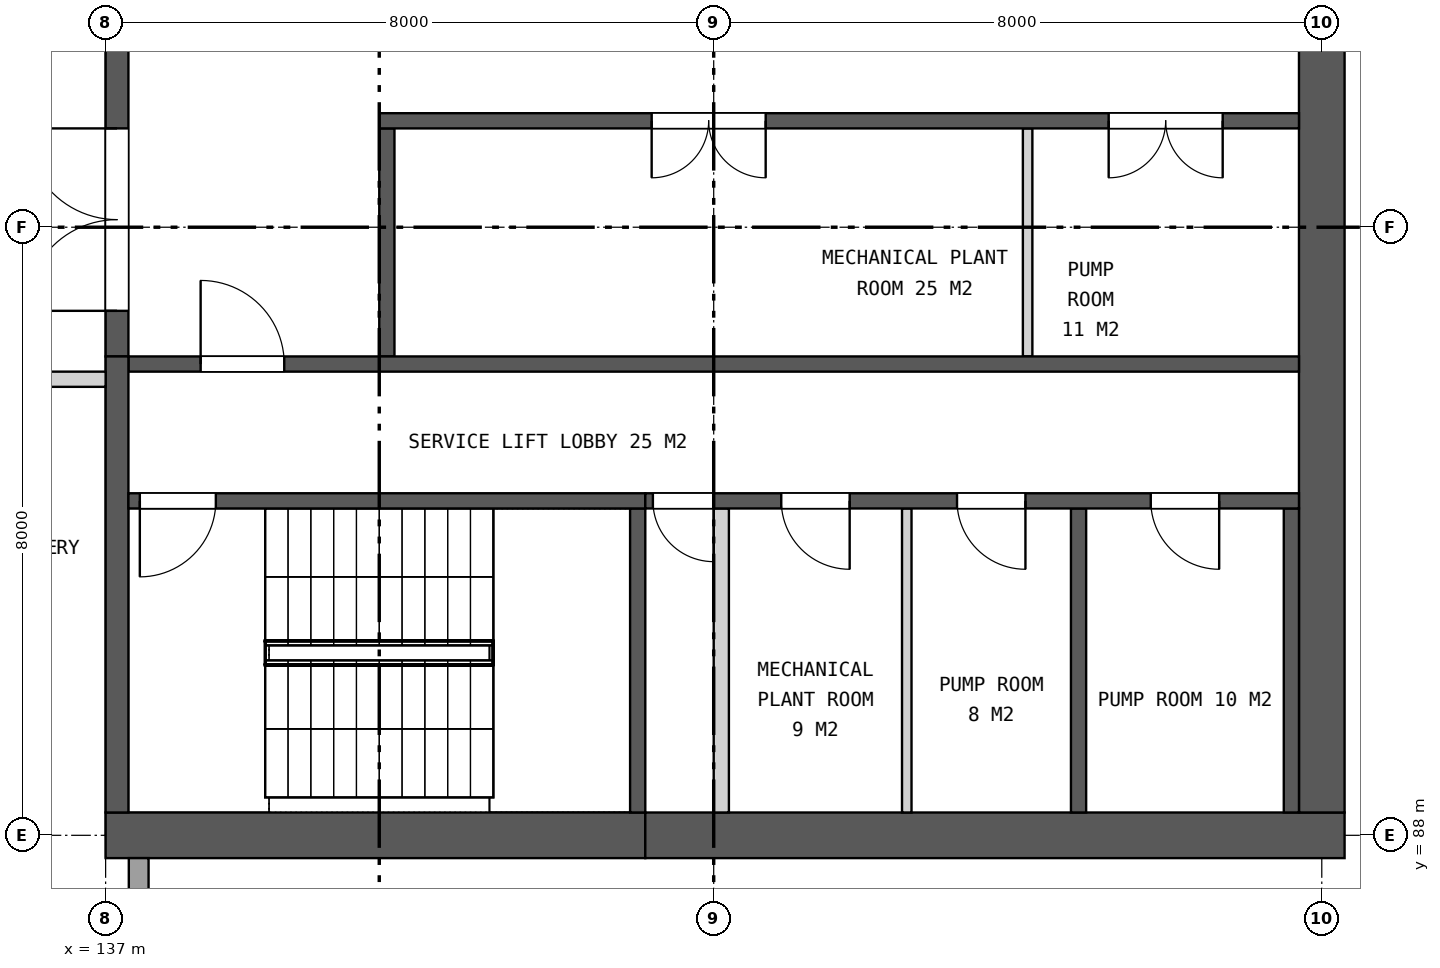
"""IFC4 building model, lengths in metres.
Left out: names, types, materials, properties, quantities, classifications, styles, units other than length and angle.
Written with IfcOpenShell. Run it as: python <this file> out.ifc"""

import sys

from ifc_helpers import new_model, si_unit, direction, frame, frame_2d, origin, place, context, subcontext, project, spatial, rectangle, extrude, element, fill, save


model = new_model("IFC4")
c1 = context("Model", 3, precision=1e-05, world=origin(), true_north=direction((0.0, 1.0)))
c2 = subcontext(c1, "Body", "Model", "MODEL_VIEW")
j1 = project(units=[si_unit("LENGTHUNIT", "METRE"), si_unit("PLANEANGLEUNIT", "RADIAN")], contexts=[c1])
p1 = place(None, origin())
s1 = spatial("IfcSite", under=j1, at=p1, CompositionType="ELEMENT")
p2 = place(p1, origin())
s2 = spatial("IfcBuilding", under=s1, at=p2, CompositionType="ELEMENT")
p3 = place(p2, frame((0.0, 0.0, 237.7)))
s3 = spatial("IfcBuildingStorey", under=s2, at=p3, CompositionType="ELEMENT", Elevation=237.7)
p4 = place(p3, frame((137.0, 88.0, 0.0), z_axis=(0.0, 0.0, 1.0), x_axis=(1.0, 0.0, 0.0)))
e1 = element("IfcWall", 1, at=p4, inside=s3, PredefinedType="SHEAR", context=c2, shape_type="SweptSolid", body=[
    extrude(rectangle(XDim=7.1, YDim=0.6, at=frame_2d((3.55, 0.0))), origin(), (0.0, 0.0, 1.0), 7.4),
])
p5 = place(p3, frame((144.1, 88.0, 0.0), z_axis=(0.0, 0.0, 1.0), x_axis=(1.0, 0.0, 0.0)))
e2 = element("IfcWall", 2, at=p5, inside=s3, PredefinedType="SHEAR", context=c2, shape_type="SweptSolid", body=[
    extrude(rectangle(XDim=9.2, YDim=0.6, at=frame_2d((4.6, 0.0))), origin(), (0.0, 0.0, 1.0), 7.4),
])
p6 = place(p3, frame((153.0, 88.3, 0.0), z_axis=(0.0, 0.0, 1.0), x_axis=(0.0, 1.0, 0.0)))
e3 = element("IfcWall", 3, at=p6, inside=s3, PredefinedType="SHEAR", context=c2, shape_type="SweptSolid", body=[
    extrude(rectangle(XDim=23.4, YDim=0.6, at=frame_2d((11.7, 0.0))), origin(), (0.0, 0.0, 1.0), 7.4),
])
p7 = place(p3, frame((137.15, 94.3, 0.0), z_axis=(0.0, 0.0, 1.0), x_axis=(0.0, 1.0, 0.0)))
e4 = element("IfcWall", 4, at=p7, inside=s3, PredefinedType="SHEAR", context=c2, shape_type="SweptSolid", body=[
    extrude(rectangle(XDim=11.4, YDim=0.3, at=frame_2d((5.7, 0.0))), origin(), (0.0, 0.0, 1.0), 7.4),
])
p8 = place(p7, frame((0.6, 0.0, 0.0)))
e5 = element("IfcOpeningElement", 5, at=p8, cuts=e4, PredefinedType="OPENING", context=c2, shape_type="SweptSolid", body=[
    extrude(rectangle(XDim=2.4, YDim=2.4, at=frame_2d((1.2, 1.2))), frame((0.0, 0.16, 0.0), z_axis=(0.0, -1.0, 0.0), x_axis=(1.0, 0.0, 0.0)), (0.0, 0.0, 1.0), 0.32),
])
p9 = place(p7, frame((4.5, 0.0, 0.0)))
e6 = element("IfcOpeningElement", 6, at=p9, cuts=e4, PredefinedType="OPENING", context=c2, shape_type="SweptSolid", body=[
    extrude(rectangle(XDim=2.4, YDim=2.4, at=frame_2d((1.2, 1.2))), frame((0.0, 0.16, 0.0), z_axis=(0.0, -1.0, 0.0), x_axis=(1.0, 0.0, 0.0)), (0.0, 0.0, 1.0), 0.32),
])
p10 = place(p7, frame((8.4, 0.0, 0.0)))
e7 = element("IfcOpeningElement", 7, at=p10, cuts=e4, PredefinedType="OPENING", context=c2, shape_type="SweptSolid", body=[
    extrude(rectangle(XDim=2.4, YDim=2.4, at=frame_2d((1.2, 1.2))), frame((0.0, 0.16, 0.0), z_axis=(0.0, -1.0, 0.0), x_axis=(1.0, 0.0, 0.0)), (0.0, 0.0, 1.0), 0.32),
])
p11 = place(p3, frame((140.7, 94.3, 0.0), z_axis=(0.0, 0.0, 1.0), x_axis=(0.0, 1.0, 0.0)))
e8 = element("IfcWall", 8, at=p11, inside=s3, PredefinedType="SHEAR", context=c2, shape_type="SweptSolid", body=[
    extrude(rectangle(XDim=3.0, YDim=0.2, at=frame_2d((1.5, 0.0))), origin(), (0.0, 0.0, 1.0), 7.4),
])
p12 = place(p3, frame((149.13, 94.3, 0.0), z_axis=(0.0, 0.0, 1.0), x_axis=(0.0, 1.0, 0.0)))
e9 = element("IfcWall", 9, at=p12, inside=s3, PredefinedType="PARTITIONING", context=c2, shape_type="SweptSolid", body=[
    extrude(rectangle(XDim=3.0, YDim=0.125, at=frame_2d((1.5, 0.0))), origin(), (0.0, 0.0, 1.0), 7.4),
])
p13 = place(p3, frame((140.6, 97.4, 0.0), z_axis=(0.0, 0.0, 1.0), x_axis=(1.0, 0.0, 0.0)))
e10 = element("IfcWall", 10, at=p13, inside=s3, PredefinedType="SHEAR", context=c2, shape_type="SweptSolid", body=[
    extrude(rectangle(XDim=12.1, YDim=0.2, at=frame_2d((6.05, 0.0))), origin(), (0.0, 0.0, 1.0), 7.4),
])
p14 = place(p13, frame((3.584, 0.0, 0.0)))
e11 = element("IfcOpeningElement", 11, at=p14, cuts=e10, PredefinedType="OPENING", context=c2, shape_type="SweptSolid", body=[
    extrude(rectangle(XDim=1.5, YDim=2.1, at=frame_2d((0.75, 1.05))), frame((0.0, 0.11, 0.0), z_axis=(0.0, -1.0, 0.0), x_axis=(1.0, 0.0, 0.0)), (0.0, 0.0, 1.0), 0.22),
])
p15 = place(p13, frame((9.596, 0.0, 0.0)))
e12 = element("IfcOpeningElement", 12, at=p15, cuts=e10, PredefinedType="OPENING", context=c2, shape_type="SweptSolid", body=[
    extrude(rectangle(XDim=1.5, YDim=2.1, at=frame_2d((0.75, 1.05))), frame((0.0, 0.11, 0.0), z_axis=(0.0, -1.0, 0.0), x_axis=(1.0, 0.0, 0.0)), (0.0, 0.0, 1.0), 0.22),
])
p16 = place(p3, frame((137.3, 94.2, 0.0), z_axis=(0.0, 0.0, 1.0), x_axis=(1.0, 0.0, 0.0)))
e13 = element("IfcWall", 13, at=p16, inside=s3, PredefinedType="SHEAR", context=c2, shape_type="SweptSolid", body=[
    extrude(rectangle(XDim=15.4, YDim=0.2, at=frame_2d((7.7, 0.0))), origin(), (0.0, 0.0, 1.0), 7.4),
])
p17 = place(p16, frame((0.95, 0.0, 0.0)))
e14 = element("IfcOpeningElement", 14, at=p17, cuts=e13, PredefinedType="OPENING", context=c2, shape_type="SweptSolid", body=[
    extrude(rectangle(XDim=1.1, YDim=2.1, at=frame_2d((0.55, 1.05))), frame((0.0, 0.11, 0.0), z_axis=(0.0, -1.0, 0.0), x_axis=(1.0, 0.0, 0.0)), (0.0, 0.0, 1.0), 0.22),
])
p18 = place(p3, frame((137.15, 88.3, 0.0), z_axis=(0.0, 0.0, 1.0), x_axis=(0.0, 1.0, 0.0)))
e15 = element("IfcWall", 15, at=p18, inside=s3, PredefinedType="SHEAR", context=c2, shape_type="SweptSolid", body=[
    extrude(rectangle(XDim=6.0, YDim=0.3, at=frame_2d((3.0, 0.0))), origin(), (0.0, 0.0, 1.0), 7.4),
])
for number, where, z_axis, x_axis in (
    (16, (144.0, 88.3, 0.0), (0.0, 0.0, 1.0), (0.0, 1.0, 0.0)),
    (17, (149.8, 88.3, 0.0), (0.0, 0.0, 1.0), (0.0, 1.0, 0.0)),
    (18, (152.6, 88.3, 0.0), (0.0, 0.0, 1.0), (0.0, 1.0, 0.0)),
):
    element("IfcWall", number, at=place(p3, frame(where, z_axis=z_axis, x_axis=x_axis)), inside=s3, PredefinedType="SHEAR", context=c2, shape_type="SweptSolid", body=[
        extrude(rectangle(XDim=4.0, YDim=0.2, at=frame_2d((2.0, 0.0))), origin(), (0.0, 0.0, 1.0), 7.4),
    ])
p19 = place(p3, frame((145.1, 88.3, 0.0), z_axis=(0.0, 0.0, 1.0), x_axis=(0.0, 1.0, 0.0)))
e19 = element("IfcWall", 19, at=p19, inside=s3, PredefinedType="PARTITIONING", context=c2, shape_type="SweptSolid", body=[
    extrude(rectangle(XDim=4.0, YDim=0.2, at=frame_2d((2.0, 0.0))), origin(), (0.0, 0.0, 1.0), 7.4),
])
p20 = place(p3, frame((147.54, 88.3, 0.0), z_axis=(0.0, 0.0, 1.0), x_axis=(0.0, 1.0, 0.0)))
e20 = element("IfcWall", 20, at=p20, inside=s3, PredefinedType="PARTITIONING", context=c2, shape_type="SweptSolid", body=[
    extrude(rectangle(XDim=4.0, YDim=0.125, at=frame_2d((2.0, 0.0))), origin(), (0.0, 0.0, 1.0), 7.4),
])
p21 = place(p3, frame((137.3, 92.4, 0.0), z_axis=(0.0, 0.0, 1.0), x_axis=(1.0, 0.0, 0.0)))
e21 = element("IfcWall", 21, at=p21, inside=s3, PredefinedType="SHEAR", context=c2, shape_type="SweptSolid", body=[
    extrude(rectangle(XDim=6.8, YDim=0.2, at=frame_2d((3.4, 0.0))), origin(), (0.0, 0.0, 1.0), 7.4),
])
p22 = place(p21, frame((0.15, 0.0, 0.0)))
e22 = element("IfcOpeningElement", 22, at=p22, cuts=e21, PredefinedType="OPENING", context=c2, shape_type="SweptSolid", body=[
    extrude(rectangle(XDim=1.0, YDim=2.1, at=frame_2d((0.5, 1.05))), frame((0.0, 0.11, 0.0), z_axis=(0.0, -1.0, 0.0), x_axis=(1.0, 0.0, 0.0)), (0.0, 0.0, 1.0), 0.22),
])
p23 = place(p3, frame((144.1, 92.4, 0.0), z_axis=(0.0, 0.0, 1.0), x_axis=(1.0, 0.0, 0.0)))
e23 = element("IfcWall", 23, at=p23, inside=s3, PredefinedType="SHEAR", context=c2, shape_type="SweptSolid", body=[
    extrude(rectangle(XDim=8.6, YDim=0.2, at=frame_2d((4.3, 0.0))), origin(), (0.0, 0.0, 1.0), 7.4),
])
p24 = place(p23, frame((0.1, 0.0, 0.0)))
e24 = element("IfcOpeningElement", 24, at=p24, cuts=e23, PredefinedType="OPENING", context=c2, shape_type="SweptSolid", body=[
    extrude(rectangle(XDim=0.8, YDim=2.1, at=frame_2d((0.4, 1.05))), frame((0.0, 0.11, 0.0), z_axis=(0.0, -1.0, 0.0), x_axis=(1.0, 0.0, 0.0)), (0.0, 0.0, 1.0), 0.22),
])
p25 = place(p23, frame((1.789, 0.0, 0.0)))
e25 = element("IfcOpeningElement", 25, at=p25, cuts=e23, PredefinedType="OPENING", context=c2, shape_type="SweptSolid", body=[
    extrude(rectangle(XDim=0.9, YDim=2.1, at=frame_2d((0.45, 1.05))), frame((0.0, 0.11, 0.0), z_axis=(0.0, -1.0, 0.0), x_axis=(1.0, 0.0, 0.0)), (0.0, 0.0, 1.0), 0.22),
])
p26 = place(p23, frame((4.101, 0.0, 0.0)))
e26 = element("IfcOpeningElement", 26, at=p26, cuts=e23, PredefinedType="OPENING", context=c2, shape_type="SweptSolid", body=[
    extrude(rectangle(XDim=0.9, YDim=2.1, at=frame_2d((0.45, 1.05))), frame((0.0, 0.11, 0.0), z_axis=(0.0, -1.0, 0.0), x_axis=(1.0, 0.0, 0.0)), (0.0, 0.0, 1.0), 0.22),
])
p27 = place(p23, frame((6.65, 0.0, 0.0)))
e27 = element("IfcOpeningElement", 27, at=p27, cuts=e23, PredefinedType="OPENING", context=c2, shape_type="SweptSolid", body=[
    extrude(rectangle(XDim=0.9, YDim=2.1, at=frame_2d((0.45, 1.05))), frame((0.0, 0.11, 0.0), z_axis=(0.0, -1.0, 0.0), x_axis=(1.0, 0.0, 0.0)), (0.0, 0.0, 1.0), 0.22),
])
p28 = place(p3, frame((137.435, 80.0, 0.0), z_axis=(0.0, 0.0, 1.0), x_axis=(0.0, 1.0, 0.0)))
e28 = element("IfcWall", 28, at=p28, inside=s3, PredefinedType="SOLIDWALL", context=c2, shape_type="SweptSolid", body=[
    extrude(rectangle(XDim=7.7, YDim=0.26, at=frame_2d((3.85, 0.0))), origin(), (0.0, 0.0, 1.0), 7.1),
])
p29 = place(p28, frame((0.8, 0.0, 1.2)))
e29 = element("IfcOpeningElement", 29, at=p29, cuts=e28, PredefinedType="OPENING", context=c2, shape_type="SweptSolid", body=[
    extrude(rectangle(XDim=2.0, YDim=3.0, at=frame_2d((1.0, 1.5))), frame((0.0, 0.14, 0.0), z_axis=(0.0, -1.0, 0.0), x_axis=(1.0, 0.0, 0.0)), (0.0, 0.0, 1.0), 0.28),
])
p30 = place(p28, frame((5.2, 0.0, 2.2)))
e30 = element("IfcOpeningElement", 30, at=p30, cuts=e28, PredefinedType="OPENING", context=c2, shape_type="SweptSolid", body=[
    extrude(rectangle(XDim=2.0, YDim=3.0, at=frame_2d((1.0, 1.5))), frame((0.0, 0.14, 0.0), z_axis=(0.0, -1.0, 0.0), x_axis=(1.0, 0.0, 0.0)), (0.0, 0.0, 1.0), 0.28),
])
p31 = place(p3, frame((131.5, 94.0, 0.0), z_axis=(0.0, 0.0, 1.0), x_axis=(1.0, 0.0, 0.0)))
e31 = element("IfcWall", 31, at=p31, inside=s3, PredefinedType="SOLIDWALL", context=c2, shape_type="SweptSolid", body=[
    extrude(rectangle(XDim=5.5, YDim=0.2, at=frame_2d((2.75, 0.0))), origin(), (0.0, 0.0, 1.0), 6.643),
])
p32 = place(p31, frame((2.25, 0.0, 0.0)))
e32 = element("IfcOpeningElement", 32, at=p32, cuts=e31, PredefinedType="OPENING", context=c2, shape_type="SweptSolid", body=[
    extrude(rectangle(XDim=1.0, YDim=2.1, at=frame_2d((0.5, 1.05))), frame((0.0, 0.11, 0.0), z_axis=(0.0, -1.0, 0.0), x_axis=(1.0, 0.0, 0.0)), (0.0, 0.0, 1.0), 0.22),
])
p33 = place(p8, origin())
e33 = element("IfcDoor", 33, at=p33, inside=s3, OperationType="DOUBLE_DOOR_SINGLE_SWING", PredefinedType="DOOR", context=c2, shape_type="SweptSolid", body=[
    extrude(rectangle(XDim=2.4, YDim=2.4, at=frame_2d((1.2, 1.2))), frame((0.0, 0.025, 0.0), z_axis=(0.0, -1.0, 0.0), x_axis=(1.0, 0.0, 0.0)), (0.0, 0.0, 1.0), 0.05),
])
fill(e5, e33)
p34 = place(p14, frame((1.5, 0.0, 0.0), z_axis=(0.0, 0.0, 1.0), x_axis=(-1.0, 0.0, 0.0)))
e34 = element("IfcDoor", 34, at=p34, inside=s3, OperationType="DOUBLE_DOOR_SINGLE_SWING", PredefinedType="DOOR", context=c2, shape_type="SweptSolid", body=[
    extrude(rectangle(XDim=1.5, YDim=2.1, at=frame_2d((0.75, 1.05))), frame((0.0, 0.025, 0.0), z_axis=(0.0, -1.0, 0.0), x_axis=(1.0, 0.0, 0.0)), (0.0, 0.0, 1.0), 0.05),
])
fill(e11, e34)
p35 = place(p15, frame((1.5, 0.0, 0.0), z_axis=(0.0, 0.0, 1.0), x_axis=(-1.0, 0.0, 0.0)))
e35 = element("IfcDoor", 35, at=p35, inside=s3, OperationType="DOUBLE_DOOR_SINGLE_SWING", PredefinedType="DOOR", context=c2, shape_type="SweptSolid", body=[
    extrude(rectangle(XDim=1.5, YDim=2.1, at=frame_2d((0.75, 1.05))), frame((0.0, 0.025, 0.0), z_axis=(0.0, -1.0, 0.0), x_axis=(1.0, 0.0, 0.0)), (0.0, 0.0, 1.0), 0.05),
])
fill(e12, e35)
p36 = place(p17, origin())
e36 = element("IfcDoor", 36, at=p36, inside=s3, OperationType="SINGLE_SWING_LEFT", PredefinedType="DOOR", context=c2, shape_type="SweptSolid", body=[
    extrude(rectangle(XDim=1.1, YDim=2.1, at=frame_2d((0.55, 1.05))), frame((0.0, 0.025, 0.0), z_axis=(0.0, -1.0, 0.0), x_axis=(1.0, 0.0, 0.0)), (0.0, 0.0, 1.0), 0.05),
])
fill(e14, e36)
p37 = place(p22, frame((1.0, 0.0, 0.0), z_axis=(0.0, 0.0, 1.0), x_axis=(-1.0, 0.0, 0.0)))
e37 = element("IfcDoor", 37, at=p37, inside=s3, OperationType="SINGLE_SWING_RIGHT", PredefinedType="DOOR", context=c2, shape_type="SweptSolid", body=[
    extrude(rectangle(XDim=1.0, YDim=2.1, at=frame_2d((0.5, 1.05))), frame((0.0, 0.025, 0.0), z_axis=(0.0, -1.0, 0.0), x_axis=(1.0, 0.0, 0.0)), (0.0, 0.0, 1.0), 0.05),
])
fill(e22, e37)
p38 = place(p24, frame((0.8, 0.0, 0.0), z_axis=(0.0, 0.0, 1.0), x_axis=(-1.0, 0.0, 0.0)))
e38 = element("IfcDoor", 38, at=p38, inside=s3, OperationType="SINGLE_SWING_LEFT", PredefinedType="DOOR", context=c2, shape_type="SweptSolid", body=[
    extrude(rectangle(XDim=0.8, YDim=2.1, at=frame_2d((0.4, 1.05))), frame((0.0, 0.025, 0.0), z_axis=(0.0, -1.0, 0.0), x_axis=(1.0, 0.0, 0.0)), (0.0, 0.0, 1.0), 0.05),
])
fill(e24, e38)
p39 = place(p25, frame((0.9, 0.0, 0.0), z_axis=(0.0, 0.0, 1.0), x_axis=(-1.0, 0.0, 0.0)))
e39 = element("IfcDoor", 39, at=p39, inside=s3, OperationType="SINGLE_SWING_LEFT", PredefinedType="DOOR", context=c2, shape_type="SweptSolid", body=[
    extrude(rectangle(XDim=0.9, YDim=2.1, at=frame_2d((0.45, 1.05))), frame((0.0, 0.025, 0.0), z_axis=(0.0, -1.0, 0.0), x_axis=(1.0, 0.0, 0.0)), (0.0, 0.0, 1.0), 0.05),
])
fill(e25, e39)
p40 = place(p26, frame((0.9, 0.0, 0.0), z_axis=(0.0, 0.0, 1.0), x_axis=(-1.0, 0.0, 0.0)))
e40 = element("IfcDoor", 40, at=p40, inside=s3, OperationType="SINGLE_SWING_LEFT", PredefinedType="DOOR", context=c2, shape_type="SweptSolid", body=[
    extrude(rectangle(XDim=0.9, YDim=2.1, at=frame_2d((0.45, 1.05))), frame((0.0, 0.025, 0.0), z_axis=(0.0, -1.0, 0.0), x_axis=(1.0, 0.0, 0.0)), (0.0, 0.0, 1.0), 0.05),
])
fill(e26, e40)
p41 = place(p27, frame((0.9, 0.0, 0.0), z_axis=(0.0, 0.0, 1.0), x_axis=(-1.0, 0.0, 0.0)))
e41 = element("IfcDoor", 41, at=p41, inside=s3, OperationType="SINGLE_SWING_LEFT", PredefinedType="DOOR", context=c2, shape_type="SweptSolid", body=[
    extrude(rectangle(XDim=0.9, YDim=2.1, at=frame_2d((0.45, 1.05))), frame((0.0, 0.025, 0.0), z_axis=(0.0, -1.0, 0.0), x_axis=(1.0, 0.0, 0.0)), (0.0, 0.0, 1.0), 0.05),
])
fill(e27, e41)
save(model, sys.argv[1])
